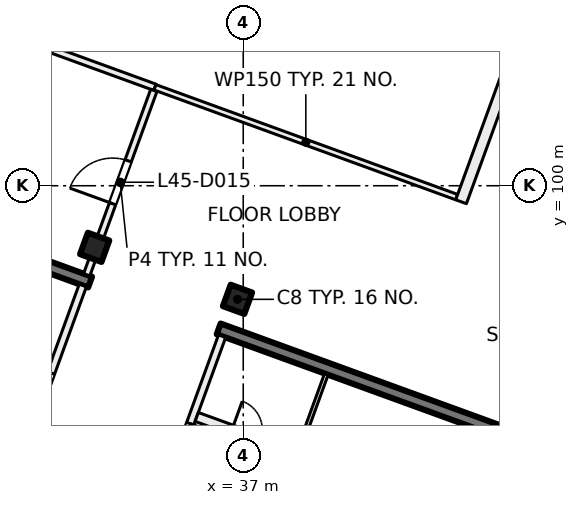
"""IFC4 building model, lengths in metres.
Left out: names, types, materials, properties, quantities, classifications, styles, units other than length and angle.
Written with IfcOpenShell. Run it as: python <this file> out.ifc"""

import sys

from ifc_helpers import new_model, si_unit, direction, frame, frame_2d, origin, origin_2d, place, context, subcontext, project, spatial, rectangle, extrude, element, fill, save


model = new_model("IFC4")
c1 = context("Model", 3, precision=1e-05, world=origin(), true_north=direction((0.0, 1.0)))
c2 = subcontext(c1, "Body", "Model", "MODEL_VIEW")
j1 = project(units=[si_unit("LENGTHUNIT", "METRE"), si_unit("PLANEANGLEUNIT", "RADIAN")], contexts=[c1])
p1 = place(None, origin())
s1 = spatial("IfcSite", under=j1, at=p1, CompositionType="ELEMENT")
p2 = place(p1, origin())
s2 = spatial("IfcBuilding", under=s1, at=p2, CompositionType="ELEMENT")
p3 = place(p2, frame((0.0, 0.0, 192.0)))
s3 = spatial("IfcBuildingStorey", under=s2, at=p3, CompositionType="ELEMENT", Elevation=192.0)
for number, where, z_axis, x_axis in (
    (1, (36.849, 97.011, 0.0), (0.0, 0.0, 1.0), (-0.342, -0.94, 0.0)),
    (2, (33.091, 98.379, 0.0), (0.0, 0.0, 1.0), (-0.342, -0.94, 0.0)),
):
    element("IfcColumn", number, at=place(p3, frame(where, z_axis=z_axis, x_axis=x_axis)), inside=s3, PredefinedType="COLUMN", context=c2, shape_type="SweptSolid", body=[
        extrude(rectangle(XDim=0.6, YDim=0.6, at=origin_2d()), origin(), (0.0, 0.0, 1.0), 4.0),
    ])
p4 = place(p3, frame((41.874, 85.232, 0.0), z_axis=(0.0, 0.0, 1.0), x_axis=(0.342020437038, 0.939692513883, 0.0)))
e3 = element("IfcWall", 3, at=p4, inside=s3, PredefinedType="SHEAR", context=c2, shape_type="SweptSolid", body=[
    extrude(rectangle(XDim=8.975, YDim=0.5, at=frame_2d((4.487, 0.0))), origin(), (0.0, 0.0, 1.0), 4.0),
])
p5 = place(p3, frame((44.529, 93.258, 0.0), z_axis=(0.0, 0.0, 1.0), x_axis=(-0.9396917844, 0.342022441267, 0.0)))
e4 = element("IfcWall", 4, at=p5, inside=s3, PredefinedType="SHEAR", context=c2, shape_type="SweptSolid", body=[
    extrude(rectangle(XDim=8.7, YDim=0.3, at=frame_2d((4.35, 0.0))), origin(), (0.0, 0.0, 1.0), 4.0),
])
p6 = place(p3, frame((32.971, 97.465, 0.0), z_axis=(0.0, 0.0, 1.0), x_axis=(-0.939695066972, 0.34201342241, 0.0)))
e5 = element("IfcWall", 5, at=p6, inside=s3, PredefinedType="SHEAR", context=c2, shape_type="SweptSolid", body=[
    extrude(rectangle(XDim=8.7, YDim=0.3, at=frame_2d((4.35, 0.0))), origin(), (0.0, 0.0, 1.0), 4.0),
])
p7 = place(p3, frame((24.666, 100.669, 0.0), z_axis=(0.0, 0.0, 1.0), x_axis=(0.34201964167, 0.939692803373, 0.0)))
e6 = element("IfcWall", 6, at=p7, inside=s3, PredefinedType="SOLIDWALL", context=c2, shape_type="SweptSolid", body=[
    extrude(rectangle(XDim=32.884, YDim=0.6, at=frame_2d((16.442, 0.0))), origin(), (0.0, 0.0, 1.0), 3.625),
])
p8 = place(p7, frame((1.48, 0.0, 0.9)))
e7 = element("IfcOpeningElement", 7, at=p8, cuts=e6, PredefinedType="OPENING", context=c2, shape_type="SweptSolid", body=[
    extrude(rectangle(XDim=3.0, YDim=2.4, at=frame_2d((1.5, 1.2))), frame((0.0, 0.31, 0.0), z_axis=(0.0, -1.0, 0.0), x_axis=(1.0, 0.0, 0.0)), (0.0, 0.0, 1.0), 0.62),
])
p9 = place(p7, frame((5.98, 0.0, 0.9)))
e8 = element("IfcOpeningElement", 8, at=p9, cuts=e6, PredefinedType="OPENING", context=c2, shape_type="SweptSolid", body=[
    extrude(rectangle(XDim=3.0, YDim=2.4, at=frame_2d((1.5, 1.2))), frame((0.0, 0.31, 0.0), z_axis=(0.0, -1.0, 0.0), x_axis=(1.0, 0.0, 0.0)), (0.0, 0.0, 1.0), 0.62),
])
p10 = place(p7, frame((10.48, 0.0, 0.9)))
e9 = element("IfcOpeningElement", 9, at=p10, cuts=e6, PredefinedType="OPENING", context=c2, shape_type="SweptSolid", body=[
    extrude(rectangle(XDim=3.0, YDim=2.4, at=frame_2d((1.5, 1.2))), frame((0.0, 0.31, 0.0), z_axis=(0.0, -1.0, 0.0), x_axis=(1.0, 0.0, 0.0)), (0.0, 0.0, 1.0), 0.62),
])
p11 = place(p7, frame((14.98, 0.0, 0.9)))
e10 = element("IfcOpeningElement", 10, at=p11, cuts=e6, PredefinedType="OPENING", context=c2, shape_type="SweptSolid", body=[
    extrude(rectangle(XDim=3.0, YDim=2.4, at=frame_2d((1.5, 1.2))), frame((0.0, 0.31, 0.0), z_axis=(0.0, -1.0, 0.0), x_axis=(1.0, 0.0, 0.0)), (0.0, 0.0, 1.0), 0.62),
])
p12 = place(p7, frame((20.08, 0.0, 0.0)))
e11 = element("IfcOpeningElement", 11, at=p12, cuts=e6, PredefinedType="OPENING", context=c2, shape_type="SweptSolid", body=[
    extrude(rectangle(XDim=1.8, YDim=2.4, at=frame_2d((0.9, 1.2))), frame((0.0, 0.31, 0.0), z_axis=(0.0, -1.0, 0.0), x_axis=(1.0, 0.0, 0.0)), (0.0, 0.0, 1.0), 0.62),
])
p13 = place(p7, frame((23.98, 0.0, 0.9)))
e12 = element("IfcOpeningElement", 12, at=p13, cuts=e6, PredefinedType="OPENING", context=c2, shape_type="SweptSolid", body=[
    extrude(rectangle(XDim=3.0, YDim=2.4, at=frame_2d((1.5, 1.2))), frame((0.0, 0.31, 0.0), z_axis=(0.0, -1.0, 0.0), x_axis=(1.0, 0.0, 0.0)), (0.0, 0.0, 1.0), 0.62),
])
p14 = place(p7, frame((28.48, 0.0, 0.9)))
e13 = element("IfcOpeningElement", 13, at=p14, cuts=e6, PredefinedType="OPENING", context=c2, shape_type="SweptSolid", body=[
    extrude(rectangle(XDim=3.0, YDim=2.4, at=frame_2d((1.5, 1.2))), frame((0.0, 0.31, 0.0), z_axis=(0.0, -1.0, 0.0), x_axis=(1.0, 0.0, 0.0)), (0.0, 0.0, 1.0), 0.62),
])
p15 = place(p3, frame((31.427, 93.663, 0.0), z_axis=(0.0, 0.0, 1.0), x_axis=(0.342030870568, 0.93968871632, 0.0)))
e14 = element("IfcWall", 14, at=p15, inside=s3, PredefinedType="PARTITIONING", context=c2, shape_type="SweptSolid", body=[
    extrude(rectangle(XDim=3.95, YDim=0.2, at=frame_2d((1.975, 0.0))), origin(), (0.0, 0.0, 1.0), 3.625),
])
p16 = place(p15, frame((0.3, 0.0, 0.0)))
e15 = element("IfcOpeningElement", 15, at=p16, cuts=e14, PredefinedType="OPENING", context=c2, shape_type="SweptSolid", body=[
    extrude(rectangle(XDim=1.2, YDim=2.1, at=frame_2d((0.6, 1.05))), frame((0.0, 0.11, 0.0), z_axis=(0.0, -1.0, 0.0), x_axis=(1.0, 0.0, 0.0)), (0.0, 0.0, 1.0), 0.22),
])
p17 = place(p3, frame((23.983, 98.208, 0.0), z_axis=(0.0, 0.0, 1.0), x_axis=(0.939699751196, -0.342000552051, 0.0)))
e16 = element("IfcWall", 16, at=p17, inside=s3, PredefinedType="PARTITIONING", context=c2, shape_type="SweptSolid", body=[
    extrude(rectangle(XDim=8.45, YDim=0.25, at=frame_2d((4.225, 0.0))), origin(), (0.0, 0.0, 1.0), 3.625),
])
p18 = place(p17, frame((6.565, 0.0, 0.0)))
e17 = element("IfcOpeningElement", 17, at=p18, cuts=e16, PredefinedType="OPENING", context=c2, shape_type="SweptSolid", body=[
    extrude(rectangle(XDim=1.0, YDim=2.1, at=frame_2d((0.5, 1.05))), frame((0.0, 0.135, 0.0), z_axis=(0.0, -1.0, 0.0), x_axis=(1.0, 0.0, 0.0)), (0.0, 0.0, 1.0), 0.27),
])
p19 = place(p17, frame((2.39, 0.0, 0.0)))
e18 = element("IfcOpeningElement", 18, at=p19, cuts=e16, PredefinedType="OPENING", context=c2, shape_type="SweptSolid", body=[
    extrude(rectangle(XDim=0.8, YDim=2.1, at=frame_2d((0.4, 1.05))), frame((0.0, 0.135, 0.0), z_axis=(0.0, -1.0, 0.0), x_axis=(1.0, 0.0, 0.0)), (0.0, 0.0, 1.0), 0.27),
])
p20 = place(p3, frame((36.443, 96.041, 0.0), z_axis=(0.0, 0.0, 1.0), x_axis=(-0.341996156931, -0.939701350773, 0.0)))
e19 = element("IfcWall", 19, at=p20, inside=s3, PredefinedType="PARTITIONING", context=c2, shape_type="SweptSolid", body=[
    extrude(rectangle(XDim=3.95, YDim=0.2, at=frame_2d((1.975, 0.0))), origin(), (0.0, 0.0, 1.0), 3.625),
])
p21 = place(p20, frame((2.45, 0.0, 0.0)))
e20 = element("IfcOpeningElement", 20, at=p21, cuts=e19, PredefinedType="OPENING", context=c2, shape_type="SweptSolid", body=[
    extrude(rectangle(XDim=1.2, YDim=2.1, at=frame_2d((0.6, 1.05))), frame((0.0, 0.11, 0.0), z_axis=(0.0, -1.0, 0.0), x_axis=(1.0, 0.0, 0.0)), (0.0, 0.0, 1.0), 0.22),
])
p22 = place(p3, frame((35.776, 93.916, 0.0), z_axis=(0.0, 0.0, 1.0), x_axis=(0.939690465531, -0.342026064782, 0.0)))
e21 = element("IfcWall", 21, at=p22, inside=s3, PredefinedType="PARTITIONING", context=c2, shape_type="SweptSolid", body=[
    extrude(rectangle(XDim=8.45, YDim=0.25, at=frame_2d((4.225, 0.0))), origin(), (0.0, 0.0, 1.0), 3.625),
])
p23 = place(p22, frame((0.985, 0.0, 0.0)))
e22 = element("IfcOpeningElement", 22, at=p23, cuts=e21, PredefinedType="OPENING", context=c2, shape_type="SweptSolid", body=[
    extrude(rectangle(XDim=0.8, YDim=2.1, at=frame_2d((0.4, 1.05))), frame((0.0, 0.135, 0.0), z_axis=(0.0, -1.0, 0.0), x_axis=(1.0, 0.0, 0.0)), (0.0, 0.0, 1.0), 0.27),
])
p24 = place(p22, frame((5.16, 0.0, 0.0)))
e23 = element("IfcOpeningElement", 23, at=p24, cuts=e21, PredefinedType="OPENING", context=c2, shape_type="SweptSolid", body=[
    extrude(rectangle(XDim=1.0, YDim=2.1, at=frame_2d((0.5, 1.05))), frame((0.0, 0.135, 0.0), z_axis=(0.0, -1.0, 0.0), x_axis=(1.0, 0.0, 0.0)), (0.0, 0.0, 1.0), 0.27),
])
p25 = place(p3, frame((39.187, 95.042, 0.0), z_axis=(0.0, 0.0, 1.0), x_axis=(-0.342023078919, -0.939691552312, 0.0)))
e24 = element("IfcWall", 24, at=p25, inside=s3, PredefinedType="PARTITIONING", context=c2, shape_type="SweptSolid", body=[
    extrude(rectangle(XDim=2.1, YDim=0.1, at=frame_2d((1.05, 0.0))), origin(), (0.0, 0.0, 1.0), 3.625),
])
p26 = place(p3, frame((26.736, 105.48, 0.0), z_axis=(0.0, 0.0, 1.0), x_axis=(0.939706509432, -0.341981982173, 0.0)))
e25 = element("IfcWall", 25, at=p26, inside=s3, PredefinedType="PARTITIONING", context=c2, shape_type="SweptSolid", body=[
    extrude(rectangle(XDim=8.45, YDim=0.175, at=frame_2d((4.225, 0.0))), origin(), (0.0, 0.0, 1.0), 3.625),
])
p27 = place(p3, frame((32.881, 97.657, 0.0), z_axis=(0.0, 0.0, 1.0), x_axis=(0.342058204353, 0.939678766832, 0.0)))
e26 = element("IfcWall", 26, at=p27, inside=s3, PredefinedType="PARTITIONING", context=c2, shape_type="SweptSolid", body=[
    extrude(rectangle(XDim=5.163, YDim=0.175, at=frame_2d((2.581, 0.0))), origin(), (0.0, 0.0, 1.0), 3.625),
])
p28 = place(p27, frame((1.991, 0.0, 0.0)))
e27 = element("IfcOpeningElement", 27, at=p28, cuts=e26, PredefinedType="OPENING", context=c2, shape_type="SweptSolid", body=[
    extrude(rectangle(XDim=1.2, YDim=2.1, at=frame_2d((0.6, 1.05))), frame((0.0, 0.097, 0.0), z_axis=(0.0, -1.0, 0.0), x_axis=(1.0, 0.0, 0.0)), (0.0, 0.0, 1.0), 0.195),
])
p29 = place(p3, frame((34.677, 102.59, 0.0), z_axis=(0.0, 0.0, 1.0), x_axis=(0.939683705252, -0.342044637561, 0.0)))
e28 = element("IfcWall", 28, at=p29, inside=s3, PredefinedType="PARTITIONING", context=c2, shape_type="SweptSolid", body=[
    extrude(rectangle(XDim=8.45, YDim=0.15, at=frame_2d((4.225, 0.0))), origin(), (0.0, 0.0, 1.0), 3.625),
])
p30 = place(p3, frame((42.732, 99.579, 0.0), z_axis=(0.0, 0.0, 1.0), x_axis=(0.342053589012, 0.939680446877, 0.0)))
e29 = element("IfcWall", 29, at=p30, inside=s3, PredefinedType="PARTITIONING", context=c2, shape_type="SweptSolid", body=[
    extrude(rectangle(XDim=23.166, YDim=0.3, at=frame_2d((11.583, 0.0))), origin(), (0.0, 0.0, 1.0), 3.625),
])
p31 = place(p30, frame((15.225, 0.0, 0.0)))
e30 = element("IfcOpeningElement", 30, at=p31, cuts=e29, PredefinedType="OPENING", context=c2, shape_type="SweptSolid", body=[
    extrude(rectangle(XDim=1.2, YDim=2.1, at=frame_2d((0.6, 1.05))), frame((0.0, 0.16, 0.0), z_axis=(0.0, -1.0, 0.0), x_axis=(1.0, 0.0, 0.0)), (0.0, 0.0, 1.0), 0.32),
])
p32 = place(p30, frame((19.725, 0.0, 0.0)))
e31 = element("IfcOpeningElement", 31, at=p32, cuts=e29, PredefinedType="OPENING", context=c2, shape_type="SweptSolid", body=[
    extrude(rectangle(XDim=1.2, YDim=2.1, at=frame_2d((0.6, 1.05))), frame((0.0, 0.16, 0.0), z_axis=(0.0, -1.0, 0.0), x_axis=(1.0, 0.0, 0.0)), (0.0, 0.0, 1.0), 0.32),
])
p33 = place(p30, frame((5.925, 0.0, 0.0)))
e32 = element("IfcOpeningElement", 32, at=p33, cuts=e29, PredefinedType="OPENING", context=c2, shape_type="SweptSolid", body=[
    extrude(rectangle(XDim=1.8, YDim=2.1, at=frame_2d((0.9, 1.05))), frame((0.0, 0.16, 0.0), z_axis=(0.0, -1.0, 0.0), x_axis=(1.0, 0.0, 0.0)), (0.0, 0.0, 1.0), 0.32),
])
p34 = place(p16, origin())
e33 = element("IfcDoor", 33, at=p34, inside=s3, OperationType="DOUBLE_DOOR_SINGLE_SWING", PredefinedType="DOOR", context=c2, shape_type="SweptSolid", body=[
    extrude(rectangle(XDim=1.2, YDim=2.1, at=frame_2d((0.6, 1.05))), frame((0.0, 0.025, 0.0), z_axis=(0.0, -1.0, 0.0), x_axis=(1.0, 0.0, 0.0)), (0.0, 0.0, 1.0), 0.05),
])
fill(e15, e33)
p35 = place(p21, origin())
e34 = element("IfcDoor", 34, at=p35, inside=s3, OperationType="DOUBLE_DOOR_SINGLE_SWING", PredefinedType="DOOR", context=c2, shape_type="SweptSolid", body=[
    extrude(rectangle(XDim=1.2, YDim=2.1, at=frame_2d((0.6, 1.05))), frame((0.0, 0.025, 0.0), z_axis=(0.0, -1.0, 0.0), x_axis=(1.0, 0.0, 0.0)), (0.0, 0.0, 1.0), 0.05),
])
fill(e20, e34)
p36 = place(p28, origin())
e35 = element("IfcDoor", 35, at=p36, inside=s3, OperationType="DOUBLE_DOOR_SINGLE_SWING", PredefinedType="DOOR", context=c2, shape_type="SweptSolid", body=[
    extrude(rectangle(XDim=1.2, YDim=2.1, at=frame_2d((0.6, 1.05))), frame((0.0, 0.025, 0.0), z_axis=(0.0, -1.0, 0.0), x_axis=(1.0, 0.0, 0.0)), (0.0, 0.0, 1.0), 0.05),
])
fill(e27, e35)
save(model, sys.argv[1])
